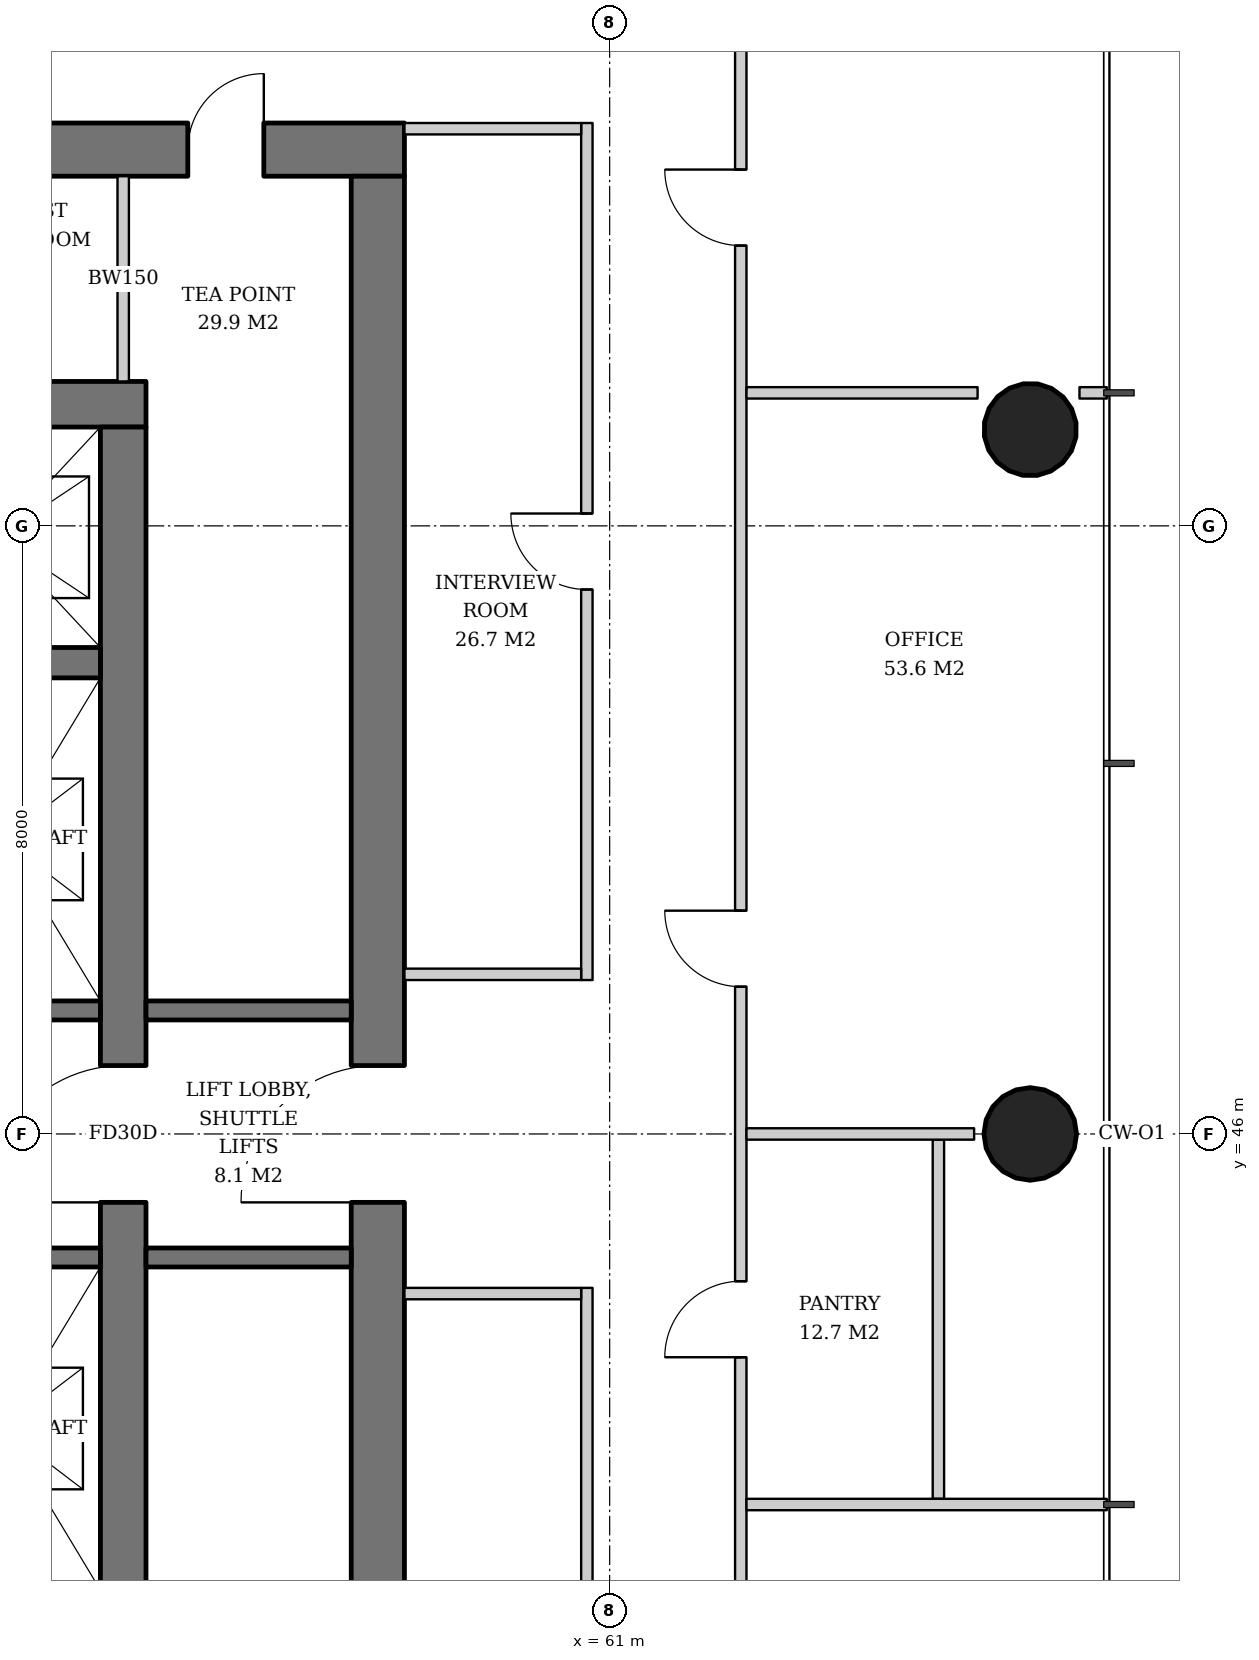
"""IFC4 building model, lengths in metres.
Left out: names, types, materials, properties, quantities, classifications, styles, units other than length and angle.
Written with IfcOpenShell. Run it as: python <this file> out.ifc"""

import sys

from ifc_helpers import new_model, si_unit, direction, frame, frame_2d, origin, origin_2d, place, context, subcontext, project, spatial, rectangle, hollow_circle, extrude, element, fill, save


model = new_model("IFC4")
c1 = context("Model", 3, precision=1e-05, world=origin(), true_north=direction((0.0, 1.0)))
c2 = subcontext(c1, "Body", "Model", "MODEL_VIEW")
j1 = project(units=[si_unit("LENGTHUNIT", "METRE"), si_unit("PLANEANGLEUNIT", "RADIAN")], contexts=[c1])
p1 = place(None, origin())
s1 = spatial("IfcSite", under=j1, at=p1, CompositionType="ELEMENT")
p2 = place(p1, origin())
s2 = spatial("IfcBuilding", under=s1, at=p2, CompositionType="ELEMENT")
p3 = place(p2, frame((0.0, 0.0, 97.0)))
s3 = spatial("IfcBuildingStorey", under=s2, at=p3, CompositionType="ELEMENT", Elevation=97.0)
p4 = place(p3, frame((66.572, 46.0, 0.0), z_axis=(-0.031978496719, 0.0, 0.999488557087), x_axis=(0.0, -1.0, 0.0)))
e1 = element("IfcColumn", 1, at=p4, inside=s3, PredefinedType="COLUMN", context=c2, shape_type="SweptSolid", body=[
    extrude(hollow_circle(Radius=0.61, WallThickness=0.04, at=origin_2d()), origin(), (0.0, 0.0, 1.0), 3.802),
])
p5 = place(p3, frame((66.572, 55.286, 0.0), z_axis=(-0.031974442509, -0.015923015547, 0.999361842679), x_axis=(0.445775033553, -0.895145027055, 0.0)))
e2 = element("IfcColumn", 2, at=p5, inside=s3, PredefinedType="COLUMN", context=c2, shape_type="SweptSolid", body=[
    extrude(hollow_circle(Radius=0.61, WallThickness=0.04, at=origin_2d()), origin(), (0.0, 0.0, 1.0), 3.802),
])
p6 = place(p3, frame((35.1, 55.6, 0.0), z_axis=(0.0, 0.0, 1.0), x_axis=(1.0, 0.0, 0.0)))
e3 = element("IfcWall", 3, at=p6, inside=s3, PredefinedType="SHEAR", context=c2, shape_type="SweptSolid", body=[
    extrude(rectangle(XDim=19.8, YDim=0.6, at=frame_2d((9.9, 0.0))), origin(), (0.0, 0.0, 1.0), 3.8),
])
p7 = place(p6, frame((14.54, 0.0, 0.0)))
e4 = element("IfcOpeningElement", 4, at=p7, cuts=e3, PredefinedType="OPENING", context=c2, shape_type="SweptSolid", body=[
    extrude(rectangle(XDim=1.0, YDim=2.1, at=frame_2d((0.5, 1.05))), frame((0.0, 0.31, 0.0), z_axis=(0.0, -1.0, 0.0), x_axis=(1.0, 0.0, 0.0)), (0.0, 0.0, 1.0), 0.62),
])
p8 = place(p6, frame((2.425, 0.0, 0.0)))
e5 = element("IfcOpeningElement", 5, at=p8, cuts=e3, PredefinedType="OPENING", context=c2, shape_type="SweptSolid", body=[
    extrude(rectangle(XDim=1.0, YDim=2.1, at=frame_2d((0.5, 1.05))), frame((0.0, 0.31, 0.0), z_axis=(0.0, -1.0, 0.0), x_axis=(1.0, 0.0, 0.0)), (0.0, 0.0, 1.0), 0.62),
])
p9 = place(p3, frame((54.6, 36.7, 0.0), z_axis=(0.0, 0.0, 1.0), x_axis=(0.0, 1.0, 0.0)))
e6 = element("IfcWall", 6, at=p9, inside=s3, PredefinedType="SHEAR", context=c2, shape_type="SweptSolid", body=[
    extrude(rectangle(XDim=18.6, YDim=0.6, at=frame_2d((9.3, 0.0))), origin(), (0.0, 0.0, 1.0), 3.8),
])
p10 = place(p9, frame((8.4, 0.0, 0.0)))
e7 = element("IfcOpeningElement", 7, at=p10, cuts=e6, PredefinedType="OPENING", context=c2, shape_type="SweptSolid", body=[
    extrude(rectangle(XDim=1.8, YDim=2.4, at=frame_2d((0.9, 1.2))), frame((0.0, 0.31, 0.0), z_axis=(0.0, -1.0, 0.0), x_axis=(1.0, 0.0, 0.0)), (0.0, 0.0, 1.0), 0.62),
])
p11 = place(p3, frame((31.7, 58.95, 0.0), z_axis=(0.0, 0.0, 1.0), x_axis=(1.0, 0.0, 0.0)))
e8 = element("IfcWall", 8, at=p11, inside=s3, PredefinedType="SHEAR", context=c2, shape_type="SweptSolid", body=[
    extrude(rectangle(XDim=26.6, YDim=0.7, at=frame_2d((13.3, 0.0))), origin(), (0.0, 0.0, 1.0), 3.8),
])
p12 = place(p11, frame((17.94, 0.0, 0.0)))
e9 = element("IfcOpeningElement", 9, at=p12, cuts=e8, PredefinedType="OPENING", context=c2, shape_type="SweptSolid", body=[
    extrude(rectangle(XDim=1.0, YDim=2.1, at=frame_2d((0.5, 1.05))), frame((0.0, 0.36, 0.0), z_axis=(0.0, -1.0, 0.0), x_axis=(1.0, 0.0, 0.0)), (0.0, 0.0, 1.0), 0.72),
])
p13 = place(p11, frame((5.825, 0.0, 0.0)))
e10 = element("IfcOpeningElement", 10, at=p13, cuts=e8, PredefinedType="OPENING", context=c2, shape_type="SweptSolid", body=[
    extrude(rectangle(XDim=1.0, YDim=2.1, at=frame_2d((0.5, 1.05))), frame((0.0, 0.36, 0.0), z_axis=(0.0, -1.0, 0.0), x_axis=(1.0, 0.0, 0.0)), (0.0, 0.0, 1.0), 0.72),
])
p14 = place(p11, frame((1.169, 0.0, 0.0)))
e11 = element("IfcOpeningElement", 11, at=p14, cuts=e8, PredefinedType="OPENING", context=c2, shape_type="SweptSolid", body=[
    extrude(rectangle(XDim=1.0, YDim=2.1, at=frame_2d((0.5, 1.05))), frame((0.0, 0.36, 0.0), z_axis=(0.0, -1.0, 0.0), x_axis=(1.0, 0.0, 0.0)), (0.0, 0.0, 1.0), 0.72),
])
p15 = place(p11, frame((3.447, 0.0, 0.0)))
e12 = element("IfcOpeningElement", 12, at=p15, cuts=e8, PredefinedType="OPENING", context=c2, shape_type="SweptSolid", body=[
    extrude(rectangle(XDim=1.0, YDim=2.1, at=frame_2d((0.5, 1.05))), frame((0.0, 0.36, 0.0), z_axis=(0.0, -1.0, 0.0), x_axis=(1.0, 0.0, 0.0)), (0.0, 0.0, 1.0), 0.72),
])
p16 = place(p11, frame((11.577, 0.0, 0.0)))
e13 = element("IfcOpeningElement", 13, at=p16, cuts=e8, PredefinedType="OPENING", context=c2, shape_type="SweptSolid", body=[
    extrude(rectangle(XDim=1.0, YDim=2.1, at=frame_2d((0.5, 1.05))), frame((0.0, 0.36, 0.0), z_axis=(0.0, -1.0, 0.0), x_axis=(1.0, 0.0, 0.0)), (0.0, 0.0, 1.0), 0.72),
])
p17 = place(p11, frame((20.9, 0.0, 0.0)))
e14 = element("IfcOpeningElement", 14, at=p17, cuts=e8, PredefinedType="OPENING", context=c2, shape_type="SweptSolid", body=[
    extrude(rectangle(XDim=1.0, YDim=2.1, at=frame_2d((0.5, 1.05))), frame((0.0, 0.36, 0.0), z_axis=(0.0, -1.0, 0.0), x_axis=(1.0, 0.0, 0.0)), (0.0, 0.0, 1.0), 0.72),
])
p18 = place(p11, frame((23.75, 0.0, 0.0)))
e15 = element("IfcOpeningElement", 15, at=p18, cuts=e8, PredefinedType="OPENING", context=c2, shape_type="SweptSolid", body=[
    extrude(rectangle(XDim=1.0, YDim=2.1, at=frame_2d((0.5, 1.05))), frame((0.0, 0.36, 0.0), z_axis=(0.0, -1.0, 0.0), x_axis=(1.0, 0.0, 0.0)), (0.0, 0.0, 1.0), 0.72),
])
p19 = place(p3, frame((57.95, 33.4, 0.0), z_axis=(0.0, 0.0, 1.0), x_axis=(0.0, 1.0, 0.0)))
e16 = element("IfcWall", 16, at=p19, inside=s3, PredefinedType="SHEAR", context=c2, shape_type="SweptSolid", body=[
    extrude(rectangle(XDim=25.2, YDim=0.7, at=frame_2d((12.6, 0.0))), origin(), (0.0, 0.0, 1.0), 3.8),
])
p20 = place(p19, frame((11.7, 0.0, 0.0)))
e17 = element("IfcOpeningElement", 17, at=p20, cuts=e16, PredefinedType="OPENING", context=c2, shape_type="SweptSolid", body=[
    extrude(rectangle(XDim=1.8, YDim=2.4, at=frame_2d((0.9, 1.2))), frame((0.0, 0.36, 0.0), z_axis=(0.0, -1.0, 0.0), x_axis=(1.0, 0.0, 0.0)), (0.0, 0.0, 1.0), 0.72),
])
p21 = place(p3, frame((35.7, 52.2, 0.0), z_axis=(0.0, 0.0, 1.0), x_axis=(1.0, 0.0, 0.0)))
e18 = element("IfcWall", 18, at=p21, inside=s3, PredefinedType="SHEAR", context=c2, shape_type="SweptSolid", body=[
    extrude(rectangle(XDim=18.6, YDim=0.4, at=frame_2d((9.3, 0.0))), origin(), (0.0, 0.0, 1.0), 3.8),
])
for number, where, z_axis, x_axis in (
    (19, (48.93, 47.625, 0.0), (0.0, 0.0, 1.0), (1.0, 0.0, 0.0)),
    (20, (48.93, 44.375, 0.0), (0.0, 0.0, 1.0), (1.0, 0.0, 0.0)),
):
    element("IfcWall", number, at=place(p3, frame(where, z_axis=z_axis, x_axis=x_axis)), inside=s3, PredefinedType="SHEAR", context=c2, shape_type="SweptSolid", body=[
        extrude(rectangle(XDim=5.37, YDim=0.25, at=frame_2d((2.685, 0.0))), origin(), (0.0, 0.0, 1.0), 3.8),
    ])
for number, where, z_axis, x_axis in (
    (21, (54.9, 44.375, 0.0), (0.0, 0.0, 1.0), (1.0, 0.0, 0.0)),
    (22, (54.9, 47.625, 0.0), (0.0, 0.0, 1.0), (1.0, 0.0, 0.0)),
):
    element("IfcWall", number, at=place(p3, frame(where, z_axis=z_axis, x_axis=x_axis)), inside=s3, PredefinedType="SOLIDWALL", context=c2, shape_type="SweptSolid", body=[
        extrude(rectangle(XDim=2.7, YDim=0.25, at=frame_2d((1.35, 0.0))), origin(), (0.0, 0.0, 1.0), 3.62),
    ])
p22 = place(p3, frame((54.6, 55.9, 0.0), z_axis=(0.0, 0.0, 1.0), x_axis=(0.0, 1.0, 0.0)))
e23 = element("IfcWall", 23, at=p22, inside=s3, PredefinedType="SOLIDWALL", context=c2, shape_type="SweptSolid", body=[
    extrude(rectangle(XDim=2.7, YDim=0.15, at=frame_2d((1.35, 0.0))), origin(), (0.0, 0.0, 1.0), 3.62),
])
p23 = place(p3, frame((60.7, 32.7, 0.0), z_axis=(0.0, 0.0, 1.0), x_axis=(0.0, 1.0, 0.0)))
e24 = element("IfcWall", 24, at=p23, inside=s3, PredefinedType="PARTITIONING", context=c2, shape_type="SweptSolid", body=[
    extrude(rectangle(XDim=11.275, YDim=0.15, at=frame_2d((5.638, 0.0))), origin(), (0.0, 0.0, 1.0), 2.72),
])
p24 = place(p23, frame((5.137, 0.0, 0.0)))
e25 = element("IfcOpeningElement", 25, at=p24, cuts=e24, PredefinedType="OPENING", context=c2, shape_type="SweptSolid", body=[
    extrude(rectangle(XDim=1.0, YDim=2.1, at=frame_2d((0.5, 1.05))), frame((0.0, 0.085, 0.0), z_axis=(0.0, -1.0, 0.0), x_axis=(1.0, 0.0, 0.0)), (0.0, 0.0, 1.0), 0.17),
])
p25 = place(p3, frame((58.3, 43.9, 0.0), z_axis=(0.0, 0.0, 1.0), x_axis=(1.0, 0.0, 0.0)))
e26 = element("IfcWall", 26, at=p25, inside=s3, PredefinedType="PARTITIONING", context=c2, shape_type="SweptSolid", body=[
    extrude(rectangle(XDim=2.325, YDim=0.15, at=frame_2d((1.163, 0.0))), origin(), (0.0, 0.0, 1.0), 3.62),
])
p26 = place(p3, frame((60.7, 48.025, 0.0), z_axis=(0.0, 0.0, 1.0), x_axis=(0.0, 1.0, 0.0)))
e27 = element("IfcWall", 27, at=p26, inside=s3, PredefinedType="PARTITIONING", context=c2, shape_type="SweptSolid", body=[
    extrude(rectangle(XDim=11.275, YDim=0.15, at=frame_2d((5.638, 0.0))), origin(), (0.0, 0.0, 1.0), 2.806),
])
p27 = place(p26, frame((5.137, 0.0, 0.0)))
e28 = element("IfcOpeningElement", 28, at=p27, cuts=e27, PredefinedType="OPENING", context=c2, shape_type="SweptSolid", body=[
    extrude(rectangle(XDim=1.0, YDim=2.1, at=frame_2d((0.5, 1.05))), frame((0.0, 0.085, 0.0), z_axis=(0.0, -1.0, 0.0), x_axis=(1.0, 0.0, 0.0)), (0.0, 0.0, 1.0), 0.17),
])
for number, where, z_axis, x_axis in (
    (29, (58.3, 48.1, 0.0), (0.0, 0.0, 1.0), (1.0, 0.0, 0.0)),
    (30, (58.3, 59.225, 0.0), (0.0, 0.0, 1.0), (1.0, 0.0, 0.0)),
):
    element("IfcWall", number, at=place(p3, frame(where, z_axis=z_axis, x_axis=x_axis)), inside=s3, PredefinedType="PARTITIONING", context=c2, shape_type="SweptSolid", body=[
        extrude(rectangle(XDim=2.325, YDim=0.15, at=frame_2d((1.163, 0.0))), origin(), (0.0, 0.0, 1.0), 3.62),
    ])
p28 = place(p3, frame((65.325, 41.2, 0.0), z_axis=(0.0, 0.0, 1.0), x_axis=(0.0, 1.0, 0.0)))
e31 = element("IfcWall", 31, at=p28, inside=s3, PredefinedType="PARTITIONING", context=c2, shape_type="SweptSolid", body=[
    extrude(rectangle(XDim=4.725, YDim=0.15, at=frame_2d((2.363, 0.0))), origin(), (0.0, 0.0, 1.0), 2.858),
])
p29 = place(p3, frame((62.725, 30.188, 0.0), z_axis=(0.0, 0.0, 1.0), x_axis=(0.0, 1.0, 0.0)))
e32 = element("IfcWall", 32, at=p29, inside=s3, PredefinedType="PARTITIONING", context=c2, shape_type="SweptSolid", body=[
    extrude(rectangle(XDim=31.623, YDim=0.15, at=frame_2d((15.812, 0.0))), origin(), (0.0, 0.0, 1.0), 2.72),
])
p30 = place(p29, frame((3.124, 0.0, 0.0)))
e33 = element("IfcOpeningElement", 33, at=p30, cuts=e32, PredefinedType="OPENING", context=c2, shape_type="SweptSolid", body=[
    extrude(rectangle(XDim=1.0, YDim=2.1, at=frame_2d((0.5, 1.05))), frame((0.0, 0.085, 0.0), z_axis=(0.0, -1.0, 0.0), x_axis=(1.0, 0.0, 0.0)), (0.0, 0.0, 1.0), 0.17),
])
p31 = place(p29, frame((7.999, 0.0, 0.0)))
e34 = element("IfcOpeningElement", 34, at=p31, cuts=e32, PredefinedType="OPENING", context=c2, shape_type="SweptSolid", body=[
    extrude(rectangle(XDim=1.0, YDim=2.1, at=frame_2d((0.5, 1.05))), frame((0.0, 0.085, 0.0), z_axis=(0.0, -1.0, 0.0), x_axis=(1.0, 0.0, 0.0)), (0.0, 0.0, 1.0), 0.17),
])
p32 = place(p29, frame((12.874, 0.0, 0.0)))
e35 = element("IfcOpeningElement", 35, at=p32, cuts=e32, PredefinedType="OPENING", context=c2, shape_type="SweptSolid", body=[
    extrude(rectangle(XDim=1.0, YDim=2.1, at=frame_2d((0.5, 1.05))), frame((0.0, 0.085, 0.0), z_axis=(0.0, -1.0, 0.0), x_axis=(1.0, 0.0, 0.0)), (0.0, 0.0, 1.0), 0.17),
])
p33 = place(p29, frame((17.749, 0.0, 0.0)))
e36 = element("IfcOpeningElement", 36, at=p33, cuts=e32, PredefinedType="OPENING", context=c2, shape_type="SweptSolid", body=[
    extrude(rectangle(XDim=1.0, YDim=2.1, at=frame_2d((0.5, 1.05))), frame((0.0, 0.085, 0.0), z_axis=(0.0, -1.0, 0.0), x_axis=(1.0, 0.0, 0.0)), (0.0, 0.0, 1.0), 0.17),
])
p34 = place(p29, frame((27.499, 0.0, 0.0)))
e37 = element("IfcOpeningElement", 37, at=p34, cuts=e32, PredefinedType="OPENING", context=c2, shape_type="SweptSolid", body=[
    extrude(rectangle(XDim=1.0, YDim=2.1, at=frame_2d((0.5, 1.05))), frame((0.0, 0.085, 0.0), z_axis=(0.0, -1.0, 0.0), x_axis=(1.0, 0.0, 0.0)), (0.0, 0.0, 1.0), 0.17),
])
p35 = place(p3, frame((62.8, 41.125, 0.0), z_axis=(0.0, 0.0, 1.0), x_axis=(1.0, 0.0, 0.0)))
e38 = element("IfcWall", 38, at=p35, inside=s3, PredefinedType="PARTITIONING", context=c2, shape_type="SweptSolid", body=[
    extrude(rectangle(XDim=4.74, YDim=0.15, at=frame_2d((2.37, 0.0))), origin(), (0.0, 0.0, 1.0), 2.82),
])
p36 = place(p3, frame((62.8, 46.0, 0.0), z_axis=(0.0, 0.0, 1.0), x_axis=(1.0, 0.0, 0.0)))
e39 = element("IfcWall", 39, at=p36, inside=s3, PredefinedType="PARTITIONING", context=c2, shape_type="SweptSolid", body=[
    extrude(rectangle(XDim=2.995, YDim=0.15, at=frame_2d((1.498, 0.0))), origin(), (0.0, 0.0, 1.0), 2.858),
])
p37 = place(p3, frame((62.8, 55.75, 0.0), z_axis=(0.0, 0.0, 1.0), x_axis=(1.0, 0.0, 0.0)))
e40 = element("IfcWall", 40, at=p37, inside=s3, PredefinedType="PARTITIONING", context=c2, shape_type="SweptSolid", body=[
    extrude(rectangle(XDim=3.041, YDim=0.15, at=frame_2d((1.52, 0.0))), origin(), (0.0, 0.0, 1.0), 3.62),
])
p38 = place(p3, frame((67.181, 55.75, 0.0), z_axis=(0.0, 0.0, 1.0), x_axis=(1.0, 0.0, 0.0)))
e41 = element("IfcWall", 41, at=p38, inside=s3, PredefinedType="PARTITIONING", context=c2, shape_type="SweptSolid", body=[
    extrude(rectangle(XDim=0.359, YDim=0.15, at=frame_2d((0.18, 0.0))), origin(), (0.0, 0.0, 1.0), 3.62),
])
p39 = place(p10, origin())
e42 = element("IfcDoor", 42, at=p39, inside=s3, OperationType="DOUBLE_DOOR_SINGLE_SWING", PredefinedType="DOOR", context=c2, shape_type="SweptSolid", body=[
    extrude(rectangle(XDim=1.8, YDim=2.4, at=frame_2d((0.9, 1.2))), frame((0.0, 0.025, 0.0), z_axis=(0.0, -1.0, 0.0), x_axis=(1.0, 0.0, 0.0)), (0.0, 0.0, 1.0), 0.05),
])
fill(e7, e42)
p40 = place(p20, origin())
e43 = element("IfcDoor", 43, at=p40, inside=s3, OperationType="DOUBLE_DOOR_SINGLE_SWING", PredefinedType="DOOR", context=c2, shape_type="SweptSolid", body=[
    extrude(rectangle(XDim=1.8, YDim=2.4, at=frame_2d((0.9, 1.2))), frame((0.0, 0.025, 0.0), z_axis=(0.0, -1.0, 0.0), x_axis=(1.0, 0.0, 0.0)), (0.0, 0.0, 1.0), 0.05),
])
fill(e17, e43)
p41 = place(p18, origin())
e44 = element("IfcDoor", 44, at=p41, inside=s3, OperationType="SINGLE_SWING_RIGHT", PredefinedType="DOOR", context=c2, shape_type="SweptSolid", body=[
    extrude(rectangle(XDim=1.0, YDim=2.1, at=frame_2d((0.5, 1.05))), frame((0.0, -0.29, 0.0), z_axis=(0.0, -1.0, 0.0), x_axis=(1.0, 0.0, 0.0)), (0.0, 0.0, 1.0), 0.05),
])
fill(e15, e44)
p42 = place(p27, origin())
e45 = element("IfcDoor", 45, at=p42, inside=s3, OperationType="SINGLE_SWING_RIGHT", PredefinedType="DOOR", context=c2, shape_type="SweptSolid", body=[
    extrude(rectangle(XDim=1.0, YDim=2.1, at=frame_2d((0.5, 1.05))), frame((0.0, 0.025, 0.0), z_axis=(0.0, -1.0, 0.0), x_axis=(1.0, 0.0, 0.0)), (0.0, 0.0, 1.0), 0.05),
])
fill(e28, e45)
p43 = place(p32, origin())
e46 = element("IfcDoor", 46, at=p43, inside=s3, OperationType="SINGLE_SWING_LEFT", PredefinedType="DOOR", context=c2, shape_type="SweptSolid", body=[
    extrude(rectangle(XDim=1.0, YDim=2.1, at=frame_2d((0.5, 1.05))), frame((0.0, 0.025, 0.0), z_axis=(0.0, -1.0, 0.0), x_axis=(1.0, 0.0, 0.0)), (0.0, 0.0, 1.0), 0.05),
])
fill(e35, e46)
p44 = place(p33, origin())
e47 = element("IfcDoor", 47, at=p44, inside=s3, OperationType="SINGLE_SWING_RIGHT", PredefinedType="DOOR", context=c2, shape_type="SweptSolid", body=[
    extrude(rectangle(XDim=1.0, YDim=2.1, at=frame_2d((0.5, 1.05))), frame((0.0, 0.025, 0.0), z_axis=(0.0, -1.0, 0.0), x_axis=(1.0, 0.0, 0.0)), (0.0, 0.0, 1.0), 0.05),
])
fill(e36, e47)
p45 = place(p34, origin())
e48 = element("IfcDoor", 48, at=p45, inside=s3, OperationType="SINGLE_SWING_RIGHT", PredefinedType="DOOR", context=c2, shape_type="SweptSolid", body=[
    extrude(rectangle(XDim=1.0, YDim=2.1, at=frame_2d((0.5, 1.05))), frame((0.0, 0.025, 0.0), z_axis=(0.0, -1.0, 0.0), x_axis=(1.0, 0.0, 0.0)), (0.0, 0.0, 1.0), 0.05),
])
fill(e37, e48)
save(model, sys.argv[1])
